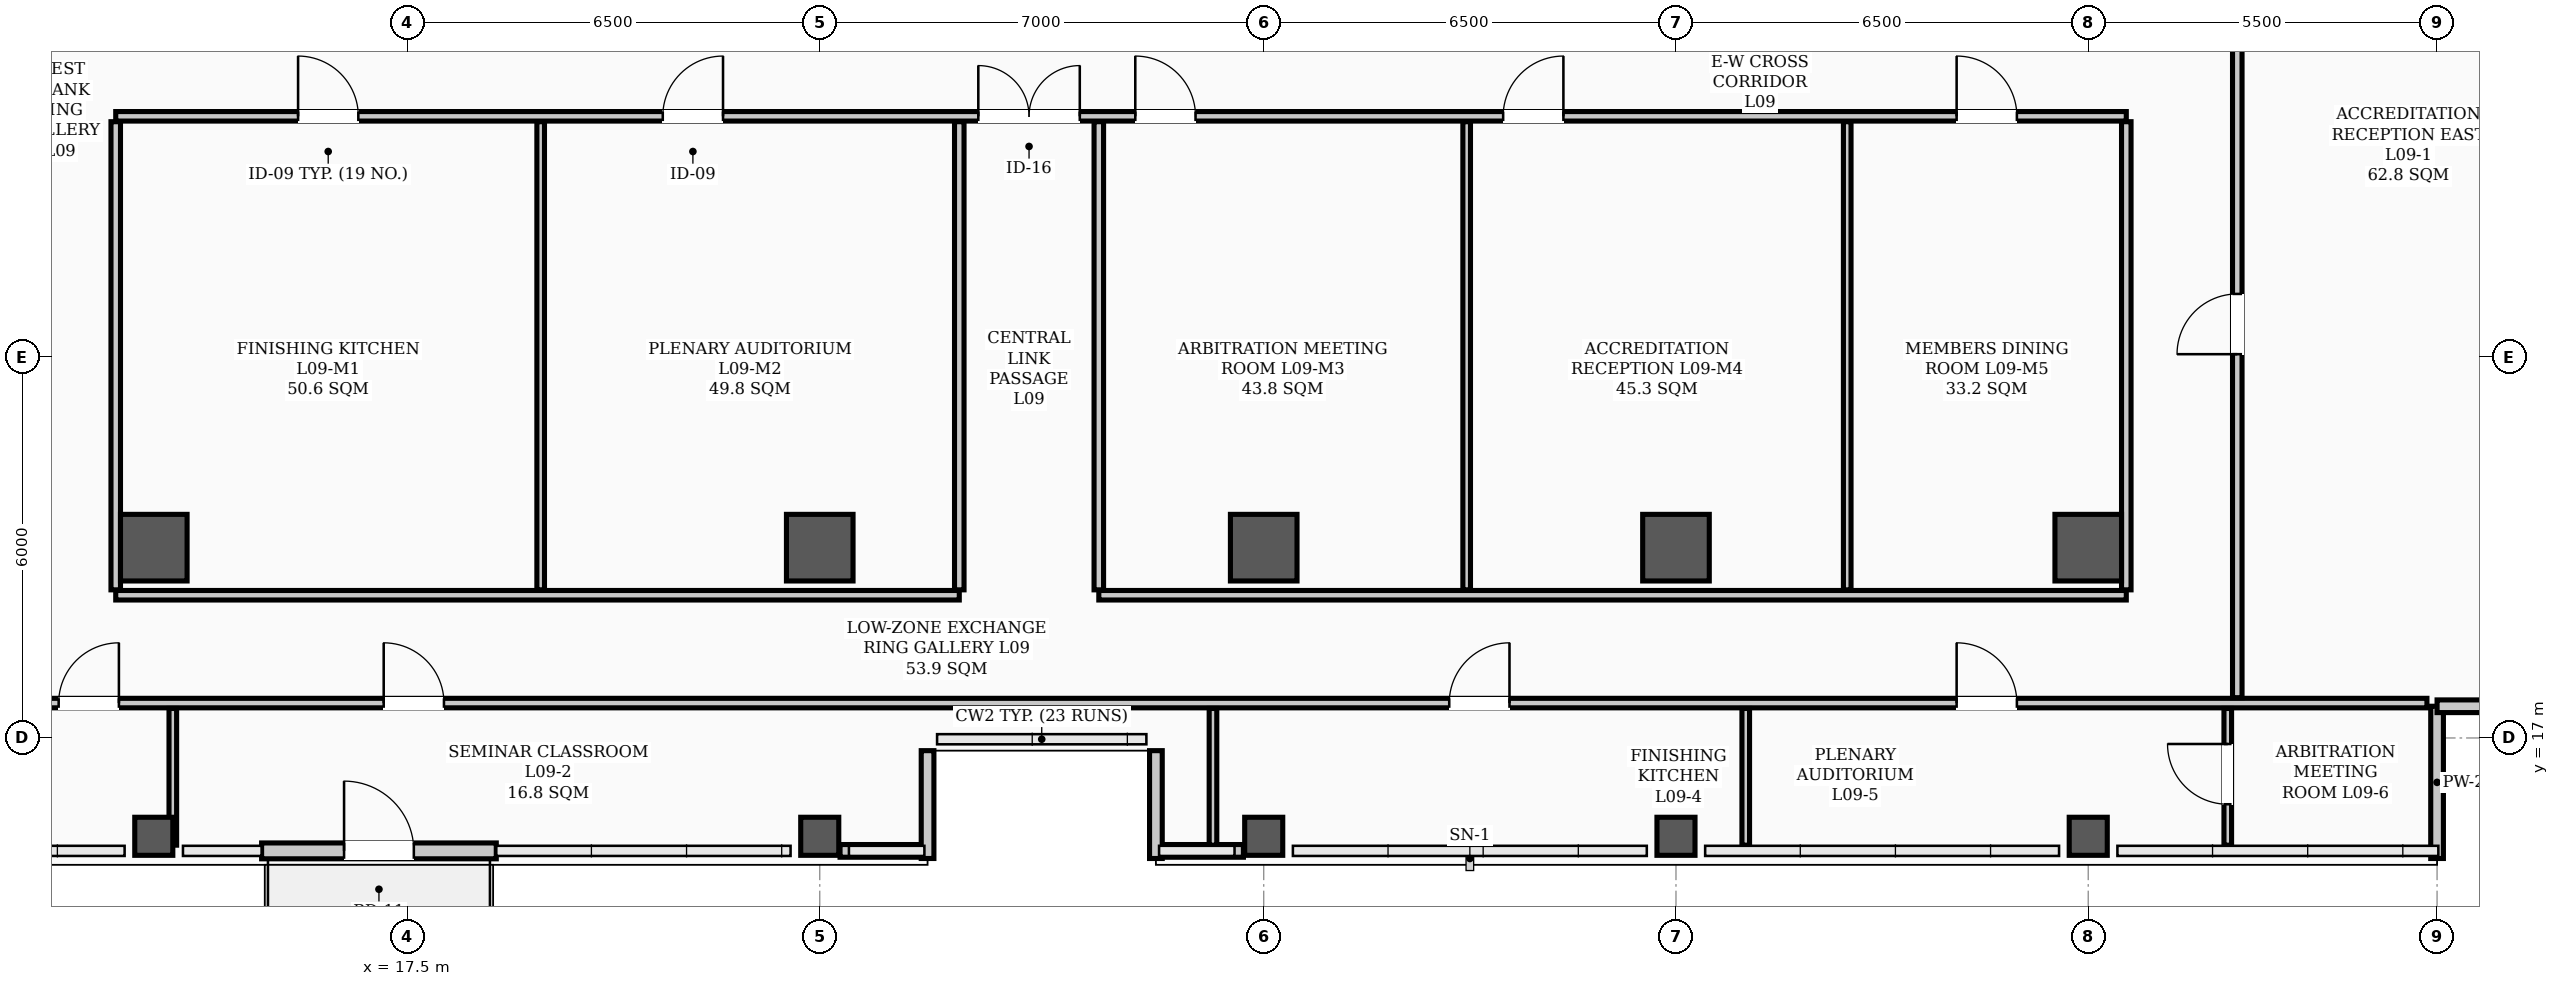
"""IFC4 building model, lengths in metres.
Left out: names, types, materials, properties, quantities, classifications, styles, units other than length and angle.
Written with IfcOpenShell. Run it as: python <this file> out.ifc"""

import sys

from ifc_helpers import new_model, si_unit, direction, frame, frame_2d, origin, origin_2d, place, context, subcontext, project, spatial, rectangle, hollow_rectangle, extrude, element, fill, save


model = new_model("IFC4")
c1 = context("Model", 3, precision=1e-05, world=origin(), true_north=direction((0.0, 1.0)))
c2 = subcontext(c1, "Body", "Model", "MODEL_VIEW")
j1 = project(units=[si_unit("LENGTHUNIT", "METRE"), si_unit("PLANEANGLEUNIT", "RADIAN")], contexts=[c1])
p1 = place(None, origin())
s1 = spatial("IfcSite", under=j1, at=p1, CompositionType="ELEMENT")
p2 = place(p1, origin())
s2 = spatial("IfcBuilding", under=s1, at=p2, CompositionType="ELEMENT")
p3 = place(p2, frame((0.0, 0.0, 38.2)))
s3 = spatial("IfcBuildingStorey", under=s2, at=p3, CompositionType="ELEMENT", Elevation=38.2)
for number, where, z_axis, x_axis in (
    (1, (13.5, 20.0, 0.0), (0.0, 0.0, 1.0), (1.0, 0.0, 0.0)),
    (2, (24.0, 20.0, 0.0), (0.0, 0.0, 1.0), (1.0, 0.0, 0.0)),
    (3, (31.0, 20.0, 0.0), (0.0, 0.0, 1.0), (1.0, 0.0, 0.0)),
    (4, (37.5, 20.0, 0.0), (0.0, 0.0, 1.0), (1.0, 0.0, 0.0)),
    (5, (44.0, 20.0, 0.0), (0.0, 0.0, 1.0), (1.0, 0.0, 0.0)),
):
    element("IfcColumn", number, at=place(p3, frame(where, z_axis=z_axis, x_axis=x_axis)), inside=s3, PredefinedType="COLUMN", context=c2, shape_type="SweptSolid", body=[
        extrude(hollow_rectangle(XDim=1.05, YDim=1.05, WallThickness=0.038, InnerFilletRadius=0.019, OuterFilletRadius=0.057, at=origin_2d()), origin(), (0.0, 0.0, 1.0), 3.9),
    ])
for number, where, z_axis, x_axis in (
    (6, (13.5, 15.45, 0.0), (0.0, 0.0, 1.0), (1.0, 0.0, 0.0)),
    (7, (24.0, 15.45, 0.0), (0.0, 0.0, 1.0), (1.0, 0.0, 0.0)),
    (8, (31.0, 15.45, 0.0), (0.0, 0.0, 1.0), (1.0, 0.0, 0.0)),
    (9, (37.5, 15.45, 0.0), (0.0, 0.0, 1.0), (1.0, 0.0, 0.0)),
    (10, (44.0, 15.45, 0.0), (0.0, 0.0, 1.0), (1.0, 0.0, 0.0)),
):
    element("IfcColumn", number, at=place(p3, frame(where, z_axis=z_axis, x_axis=x_axis)), inside=s3, PredefinedType="COLUMN", context=c2, shape_type="SweptSolid", body=[
        extrude(hollow_rectangle(XDim=0.6, YDim=0.6, WallThickness=0.026, InnerFilletRadius=0.013, OuterFilletRadius=0.039, at=origin_2d()), origin(), (0.0, 0.0, 1.0), 3.9),
    ])
for number, where, z_axis, x_axis in (
    (11, (24.32, 15.22, 0.0), (0.0, 0.0, 1.0), (1.0, 0.0, 0.0)),
    (12, (29.35, 15.22, 0.0), (0.0, 0.0, 1.0), (1.0, 0.0, 0.0)),
):
    element("IfcWall", number, at=place(p3, frame(where, z_axis=z_axis, x_axis=x_axis)), inside=s3, PredefinedType="PARAPET", context=c2, shape_type="SweptSolid", body=[
        extrude(rectangle(XDim=1.33, YDim=0.2, at=frame_2d((0.665, 0.0))), origin(), (0.0, 0.0, 1.0), 1.2),
    ])
for number, where, z_axis, x_axis in (
    (13, (49.5, 15.1, 0.0), (0.0, 0.0, 1.0), (0.0, 1.0, 0.0)),
    (14, (49.5, 17.5, 0.0), (0.0, 0.0, 1.0), (1.0, 0.0, 0.0)),
):
    element("IfcWall", number, at=place(p3, frame(where, z_axis=z_axis, x_axis=x_axis)), inside=s3, PredefinedType="PARAPET", context=c2, shape_type="SweptSolid", body=[
        extrude(rectangle(XDim=2.4, YDim=0.2, at=frame_2d((1.2, 0.0))), origin(), (0.0, 0.0, 1.0), 1.2),
    ])
for number, where, z_axis, x_axis in (
    (15, (25.7, 15.1, 0.0), (0.0, 0.0, 1.0), (0.0, 1.0, 0.0)),
    (16, (29.3, 16.8, 0.0), (0.0, 0.0, 1.0), (0.0, -1.0, 0.0)),
):
    element("IfcWall", number, at=place(p3, frame(where, z_axis=z_axis, x_axis=x_axis)), inside=s3, PredefinedType="PARAPET", context=c2, shape_type="SweptSolid", body=[
        extrude(rectangle(XDim=1.7, YDim=0.2, at=frame_2d((0.85, 0.0))), origin(), (0.0, 0.0, 1.0), 1.2),
    ])
p4 = place(p3, frame((15.2, 15.22, 0.0), z_axis=(0.0, 0.0, 1.0), x_axis=(1.0, 0.0, 0.0)))
e17 = element("IfcWall", 17, at=p4, inside=s3, PredefinedType="STANDARD", context=c2, shape_type="SweptSolid", body=[
    extrude(rectangle(XDim=3.7, YDim=0.25, at=frame_2d((1.85, 0.0))), origin(), (0.0, 0.0, 1.0), 3.18),
])
p5 = place(p4, frame((1.3, 0.0, 0.0)))
e18 = element("IfcOpeningElement", 18, at=p5, cuts=e17, PredefinedType="OPENING", context=c2, shape_type="SweptSolid", body=[
    extrude(rectangle(XDim=1.1, YDim=2.2, at=frame_2d((0.55, 1.1))), frame((0.0, 0.135, 0.0), z_axis=(0.0, -1.0, 0.0), x_axis=(1.0, 0.0, 0.0)), (0.0, 0.0, 1.0), 0.27),
])
p6 = place(p3, frame((12.9, 26.8, 0.0), z_axis=(0.0, 0.0, 1.0), x_axis=(1.0, 0.0, 0.0)))
e19 = element("IfcWall", 19, at=p6, inside=s3, PredefinedType="PARTITIONING", context=c2, shape_type="SweptSolid", body=[
    extrude(rectangle(XDim=31.7, YDim=0.15, at=frame_2d((15.85, 0.0))), origin(), (0.0, 0.0, 1.0), 3.1),
])
p7 = place(p6, frame((13.6, 0.0, 0.0)))
e20 = element("IfcOpeningElement", 20, at=p7, cuts=e19, PredefinedType="OPENING", context=c2, shape_type="SweptSolid", body=[
    extrude(rectangle(XDim=1.6, YDim=2.08, at=frame_2d((0.8, 1.04))), frame((0.0, 0.085, 0.0), z_axis=(0.0, -1.0, 0.0), x_axis=(1.0, 0.0, 0.0)), (0.0, 0.0, 1.0), 0.17),
])
p8 = place(p6, frame((2.875, 0.0, 0.0)))
e21 = element("IfcOpeningElement", 21, at=p8, cuts=e19, PredefinedType="OPENING", context=c2, shape_type="SweptSolid", body=[
    extrude(rectangle(XDim=0.95, YDim=2.08, at=frame_2d((0.475, 1.04))), frame((0.0, 0.085, 0.0), z_axis=(0.0, -1.0, 0.0), x_axis=(1.0, 0.0, 0.0)), (0.0, 0.0, 1.0), 0.17),
])
p9 = place(p6, frame((8.625, 0.0, 0.0)))
e22 = element("IfcOpeningElement", 22, at=p9, cuts=e19, PredefinedType="OPENING", context=c2, shape_type="SweptSolid", body=[
    extrude(rectangle(XDim=0.95, YDim=2.08, at=frame_2d((0.475, 1.04))), frame((0.0, 0.085, 0.0), z_axis=(0.0, -1.0, 0.0), x_axis=(1.0, 0.0, 0.0)), (0.0, 0.0, 1.0), 0.17),
])
p10 = place(p6, frame((16.075, 0.0, 0.0)))
e23 = element("IfcOpeningElement", 23, at=p10, cuts=e19, PredefinedType="OPENING", context=c2, shape_type="SweptSolid", body=[
    extrude(rectangle(XDim=0.95, YDim=2.08, at=frame_2d((0.475, 1.04))), frame((0.0, 0.085, 0.0), z_axis=(0.0, -1.0, 0.0), x_axis=(1.0, 0.0, 0.0)), (0.0, 0.0, 1.0), 0.17),
])
p11 = place(p6, frame((21.875, 0.0, 0.0)))
e24 = element("IfcOpeningElement", 24, at=p11, cuts=e19, PredefinedType="OPENING", context=c2, shape_type="SweptSolid", body=[
    extrude(rectangle(XDim=0.95, YDim=2.08, at=frame_2d((0.475, 1.04))), frame((0.0, 0.085, 0.0), z_axis=(0.0, -1.0, 0.0), x_axis=(1.0, 0.0, 0.0)), (0.0, 0.0, 1.0), 0.17),
])
p12 = place(p6, frame((29.025, 0.0, 0.0)))
e25 = element("IfcOpeningElement", 25, at=p12, cuts=e19, PredefinedType="OPENING", context=c2, shape_type="SweptSolid", body=[
    extrude(rectangle(XDim=0.95, YDim=2.08, at=frame_2d((0.475, 1.04))), frame((0.0, 0.085, 0.0), z_axis=(0.0, -1.0, 0.0), x_axis=(1.0, 0.0, 0.0)), (0.0, 0.0, 1.0), 0.17),
])
p13 = place(p3, frame((4.66, 17.55, 0.0), z_axis=(0.0, 0.0, 1.0), x_axis=(1.0, 0.0, 0.0)))
e26 = element("IfcWall", 26, at=p13, inside=s3, PredefinedType="PARTITIONING", context=c2, shape_type="SweptSolid", body=[
    extrude(rectangle(XDim=44.68, YDim=0.15, at=frame_2d((22.34, 0.0))), origin(), (0.0, 0.0, 1.0), 3.1),
])
p14 = place(p13, frame((7.34, 0.0, 0.0)))
e27 = element("IfcOpeningElement", 27, at=p14, cuts=e26, PredefinedType="OPENING", context=c2, shape_type="SweptSolid", body=[
    extrude(rectangle(XDim=0.95, YDim=2.08, at=frame_2d((0.475, 1.04))), frame((0.0, 0.085, 0.0), z_axis=(0.0, -1.0, 0.0), x_axis=(1.0, 0.0, 0.0)), (0.0, 0.0, 1.0), 0.17),
])
p15 = place(p13, frame((12.465, 0.0, 0.0)))
e28 = element("IfcOpeningElement", 28, at=p15, cuts=e26, PredefinedType="OPENING", context=c2, shape_type="SweptSolid", body=[
    extrude(rectangle(XDim=0.95, YDim=2.08, at=frame_2d((0.475, 1.04))), frame((0.0, 0.085, 0.0), z_axis=(0.0, -1.0, 0.0), x_axis=(1.0, 0.0, 0.0)), (0.0, 0.0, 1.0), 0.17),
])
p16 = place(p13, frame((29.265, 0.0, 0.0)))
e29 = element("IfcOpeningElement", 29, at=p16, cuts=e26, PredefinedType="OPENING", context=c2, shape_type="SweptSolid", body=[
    extrude(rectangle(XDim=0.95, YDim=2.08, at=frame_2d((0.475, 1.04))), frame((0.0, 0.085, 0.0), z_axis=(0.0, -1.0, 0.0), x_axis=(1.0, 0.0, 0.0)), (0.0, 0.0, 1.0), 0.17),
])
p17 = place(p13, frame((37.265, 0.0, 0.0)))
e30 = element("IfcOpeningElement", 30, at=p17, cuts=e26, PredefinedType="OPENING", context=c2, shape_type="SweptSolid", body=[
    extrude(rectangle(XDim=0.95, YDim=2.08, at=frame_2d((0.475, 1.04))), frame((0.0, 0.085, 0.0), z_axis=(0.0, -1.0, 0.0), x_axis=(1.0, 0.0, 0.0)), (0.0, 0.0, 1.0), 0.17),
])
p18 = place(p3, frame((12.9, 19.25, 0.0), z_axis=(0.0, 0.0, 1.0), x_axis=(1.0, 0.0, 0.0)))
e31 = element("IfcWall", 31, at=p18, inside=s3, PredefinedType="PARTITIONING", context=c2, shape_type="SweptSolid", body=[
    extrude(rectangle(XDim=13.3, YDim=0.15, at=frame_2d((6.65, 0.0))), origin(), (0.0, 0.0, 1.0), 3.1),
])
p19 = place(p3, frame((28.4, 19.25, 0.0), z_axis=(0.0, 0.0, 1.0), x_axis=(1.0, 0.0, 0.0)))
e32 = element("IfcWall", 32, at=p19, inside=s3, PredefinedType="PARTITIONING", context=c2, shape_type="SweptSolid", body=[
    extrude(rectangle(XDim=16.2, YDim=0.15, at=frame_2d((8.1, 0.0))), origin(), (0.0, 0.0, 1.0), 3.1),
])
for number, where, z_axis, x_axis in (
    (33, (26.2, 19.335, 0.0), (0.0, 0.0, 1.0), (0.0, 1.0, 0.0)),
    (34, (28.4, 19.335, 0.0), (0.0, 0.0, 1.0), (0.0, 1.0, 0.0)),
    (35, (12.9, 19.335, 0.0), (0.0, 0.0, 1.0), (0.0, 1.0, 0.0)),
):
    element("IfcWall", number, at=place(p3, frame(where, z_axis=z_axis, x_axis=x_axis)), inside=s3, PredefinedType="PARTITIONING", context=c2, shape_type="SweptSolid", body=[
        extrude(rectangle(XDim=7.38, YDim=0.15, at=frame_2d((3.69, 0.0))), origin(), (0.0, 0.0, 1.0), 3.0),
    ])
p20 = place(p3, frame((46.35, 17.635, 0.0), z_axis=(0.0, 0.0, 1.0), x_axis=(0.0, 1.0, 0.0)))
e36 = element("IfcWall", 36, at=p20, inside=s3, PredefinedType="PARTITIONING", context=c2, shape_type="SweptSolid", body=[
    extrude(rectangle(XDim=22.53, YDim=0.15, at=frame_2d((11.265, 0.0))), origin(), (0.0, 0.0, 1.0), 3.0),
])
p21 = place(p20, frame((5.415, 0.0, 0.0)))
e37 = element("IfcOpeningElement", 37, at=p21, cuts=e36, PredefinedType="OPENING", context=c2, shape_type="SweptSolid", body=[
    extrude(rectangle(XDim=0.95, YDim=2.08, at=frame_2d((0.475, 1.04))), frame((0.0, 0.085, 0.0), z_axis=(0.0, -1.0, 0.0), x_axis=(1.0, 0.0, 0.0)), (0.0, 0.0, 1.0), 0.17),
])
p22 = place(p20, frame((16.765, 0.0, 0.0)))
e38 = element("IfcOpeningElement", 38, at=p22, cuts=e36, PredefinedType="OPENING", context=c2, shape_type="SweptSolid", body=[
    extrude(rectangle(XDim=0.95, YDim=2.08, at=frame_2d((0.475, 1.04))), frame((0.0, 0.085, 0.0), z_axis=(0.0, -1.0, 0.0), x_axis=(1.0, 0.0, 0.0)), (0.0, 0.0, 1.0), 0.17),
])
p23 = place(p3, frame((44.6, 19.335, 0.0), z_axis=(0.0, 0.0, 1.0), x_axis=(0.0, 1.0, 0.0)))
e39 = element("IfcWall", 39, at=p23, inside=s3, PredefinedType="PARTITIONING", context=c2, shape_type="SweptSolid", body=[
    extrude(rectangle(XDim=7.38, YDim=0.15, at=frame_2d((3.69, 0.0))), origin(), (0.0, 0.0, 1.0), 3.0),
])
p24 = place(p3, frame((13.8, 15.31, 0.0), z_axis=(0.0, 0.0, 1.0), x_axis=(0.0, 1.0, 0.0)))
e40 = element("IfcWall", 40, at=p24, inside=s3, PredefinedType="PARTITIONING", context=c2, shape_type="SweptSolid", body=[
    extrude(rectangle(XDim=2.155, YDim=0.12, at=frame_2d((1.078, 0.0))), origin(), (0.0, 0.0, 1.0), 3.1),
])
for number, where, z_axis, x_axis in (
    (41, (30.2, 15.31, 0.0), (0.0, 0.0, 1.0), (0.0, 1.0, 0.0)),
    (42, (38.6, 15.31, 0.0), (0.0, 0.0, 1.0), (0.0, 1.0, 0.0)),
):
    element("IfcWall", number, at=place(p3, frame(where, z_axis=z_axis, x_axis=x_axis)), inside=s3, PredefinedType="PARTITIONING", context=c2, shape_type="SweptSolid", body=[
        extrude(rectangle(XDim=2.155, YDim=0.12, at=frame_2d((1.078, 0.0))), origin(), (0.0, 0.0, 1.0), 3.212),
    ])
p25 = place(p3, frame((46.2, 15.31, 0.0), z_axis=(0.0, 0.0, 1.0), x_axis=(0.0, 1.0, 0.0)))
e43 = element("IfcWall", 43, at=p25, inside=s3, PredefinedType="PARTITIONING", context=c2, shape_type="SweptSolid", body=[
    extrude(rectangle(XDim=2.155, YDim=0.12, at=frame_2d((1.078, 0.0))), origin(), (0.0, 0.0, 1.0), 3.72),
])
p26 = place(p25, frame((0.645, 0.0, 0.0)))
e44 = element("IfcOpeningElement", 44, at=p26, cuts=e43, PredefinedType="OPENING", context=c2, shape_type="SweptSolid", body=[
    extrude(rectangle(XDim=0.95, YDim=2.08, at=frame_2d((0.475, 1.04))), frame((0.0, 0.07, 0.0), z_axis=(0.0, -1.0, 0.0), x_axis=(1.0, 0.0, 0.0)), (0.0, 0.0, 1.0), 0.14),
])
for number, where, z_axis, x_axis in (
    (45, (19.6, 19.335, 0.0), (0.0, 0.0, 1.0), (0.0, 1.0, 0.0)),
    (46, (34.2, 19.335, 0.0), (0.0, 0.0, 1.0), (0.0, 1.0, 0.0)),
    (47, (40.2, 19.335, 0.0), (0.0, 0.0, 1.0), (0.0, 1.0, 0.0)),
):
    element("IfcWall", number, at=place(p3, frame(where, z_axis=z_axis, x_axis=x_axis)), inside=s3, PredefinedType="PARTITIONING", context=c2, shape_type="SweptSolid", body=[
        extrude(rectangle(XDim=7.38, YDim=0.12, at=frame_2d((3.69, 0.0))), origin(), (0.0, 0.0, 1.0), 3.0),
    ])
p27 = place(p5, origin())
e48 = element("IfcDoor", 48, at=p27, inside=s3, OperationType="SINGLE_SWING_LEFT", PredefinedType="DOOR", context=c2, shape_type="SweptSolid", body=[
    extrude(rectangle(XDim=1.1, YDim=2.2, at=frame_2d((0.55, 1.1))), frame((0.0, 0.025, 0.0), z_axis=(0.0, -1.0, 0.0), x_axis=(1.0, 0.0, 0.0)), (0.0, 0.0, 1.0), 0.05),
])
fill(e18, e48)
p28 = place(p7, origin())
e49 = element("IfcDoor", 49, at=p28, inside=s3, OperationType="DOUBLE_DOOR_SINGLE_SWING", PredefinedType="DOOR", context=c2, shape_type="SweptSolid", body=[
    extrude(rectangle(XDim=1.6, YDim=2.08, at=frame_2d((0.8, 1.04))), frame((0.0, 0.025, 0.0), z_axis=(0.0, -1.0, 0.0), x_axis=(1.0, 0.0, 0.0)), (0.0, 0.0, 1.0), 0.05),
])
fill(e20, e49)
p29 = place(p14, origin())
e50 = element("IfcDoor", 50, at=p29, inside=s3, OperationType="SINGLE_SWING_RIGHT", PredefinedType="DOOR", context=c2, shape_type="SweptSolid", body=[
    extrude(rectangle(XDim=0.95, YDim=2.08, at=frame_2d((0.475, 1.04))), frame((0.0, 0.025, 0.0), z_axis=(0.0, -1.0, 0.0), x_axis=(1.0, 0.0, 0.0)), (0.0, 0.0, 1.0), 0.05),
])
fill(e27, e50)
p30 = place(p15, origin())
e51 = element("IfcDoor", 51, at=p30, inside=s3, OperationType="SINGLE_SWING_LEFT", PredefinedType="DOOR", context=c2, shape_type="SweptSolid", body=[
    extrude(rectangle(XDim=0.95, YDim=2.08, at=frame_2d((0.475, 1.04))), frame((0.0, 0.025, 0.0), z_axis=(0.0, -1.0, 0.0), x_axis=(1.0, 0.0, 0.0)), (0.0, 0.0, 1.0), 0.05),
])
fill(e28, e51)
p31 = place(p16, origin())
e52 = element("IfcDoor", 52, at=p31, inside=s3, OperationType="SINGLE_SWING_RIGHT", PredefinedType="DOOR", context=c2, shape_type="SweptSolid", body=[
    extrude(rectangle(XDim=0.95, YDim=2.08, at=frame_2d((0.475, 1.04))), frame((0.0, 0.025, 0.0), z_axis=(0.0, -1.0, 0.0), x_axis=(1.0, 0.0, 0.0)), (0.0, 0.0, 1.0), 0.05),
])
fill(e29, e52)
p32 = place(p17, origin())
e53 = element("IfcDoor", 53, at=p32, inside=s3, OperationType="SINGLE_SWING_LEFT", PredefinedType="DOOR", context=c2, shape_type="SweptSolid", body=[
    extrude(rectangle(XDim=0.95, YDim=2.08, at=frame_2d((0.475, 1.04))), frame((0.0, 0.025, 0.0), z_axis=(0.0, -1.0, 0.0), x_axis=(1.0, 0.0, 0.0)), (0.0, 0.0, 1.0), 0.05),
])
fill(e30, e53)
p33 = place(p26, origin())
e54 = element("IfcDoor", 54, at=p33, inside=s3, OperationType="SINGLE_SWING_RIGHT", PredefinedType="DOOR", context=c2, shape_type="SweptSolid", body=[
    extrude(rectangle(XDim=0.95, YDim=2.08, at=frame_2d((0.475, 1.04))), frame((0.0, 0.025, 0.0), z_axis=(0.0, -1.0, 0.0), x_axis=(1.0, 0.0, 0.0)), (0.0, 0.0, 1.0), 0.05),
])
fill(e44, e54)
p34 = place(p8, origin())
e55 = element("IfcDoor", 55, at=p34, inside=s3, OperationType="SINGLE_SWING_LEFT", PredefinedType="DOOR", context=c2, shape_type="SweptSolid", body=[
    extrude(rectangle(XDim=0.95, YDim=2.08, at=frame_2d((0.475, 1.04))), frame((0.0, 0.025, 0.0), z_axis=(0.0, -1.0, 0.0), x_axis=(1.0, 0.0, 0.0)), (0.0, 0.0, 1.0), 0.05),
])
fill(e21, e55)
p35 = place(p9, origin())
e56 = element("IfcDoor", 56, at=p35, inside=s3, OperationType="SINGLE_SWING_RIGHT", PredefinedType="DOOR", context=c2, shape_type="SweptSolid", body=[
    extrude(rectangle(XDim=0.95, YDim=2.08, at=frame_2d((0.475, 1.04))), frame((0.0, 0.025, 0.0), z_axis=(0.0, -1.0, 0.0), x_axis=(1.0, 0.0, 0.0)), (0.0, 0.0, 1.0), 0.05),
])
fill(e22, e56)
p36 = place(p10, origin())
e57 = element("IfcDoor", 57, at=p36, inside=s3, OperationType="SINGLE_SWING_LEFT", PredefinedType="DOOR", context=c2, shape_type="SweptSolid", body=[
    extrude(rectangle(XDim=0.95, YDim=2.08, at=frame_2d((0.475, 1.04))), frame((0.0, 0.025, 0.0), z_axis=(0.0, -1.0, 0.0), x_axis=(1.0, 0.0, 0.0)), (0.0, 0.0, 1.0), 0.05),
])
fill(e23, e57)
p37 = place(p11, origin())
e58 = element("IfcDoor", 58, at=p37, inside=s3, OperationType="SINGLE_SWING_RIGHT", PredefinedType="DOOR", context=c2, shape_type="SweptSolid", body=[
    extrude(rectangle(XDim=0.95, YDim=2.08, at=frame_2d((0.475, 1.04))), frame((0.0, 0.025, 0.0), z_axis=(0.0, -1.0, 0.0), x_axis=(1.0, 0.0, 0.0)), (0.0, 0.0, 1.0), 0.05),
])
fill(e24, e58)
p38 = place(p12, origin())
e59 = element("IfcDoor", 59, at=p38, inside=s3, OperationType="SINGLE_SWING_LEFT", PredefinedType="DOOR", context=c2, shape_type="SweptSolid", body=[
    extrude(rectangle(XDim=0.95, YDim=2.08, at=frame_2d((0.475, 1.04))), frame((0.0, 0.025, 0.0), z_axis=(0.0, -1.0, 0.0), x_axis=(1.0, 0.0, 0.0)), (0.0, 0.0, 1.0), 0.05),
])
fill(e25, e59)
p39 = place(p21, origin())
e60 = element("IfcDoor", 60, at=p39, inside=s3, OperationType="SINGLE_SWING_LEFT", PredefinedType="DOOR", context=c2, shape_type="SweptSolid", body=[
    extrude(rectangle(XDim=0.95, YDim=2.08, at=frame_2d((0.475, 1.04))), frame((0.0, 0.025, 0.0), z_axis=(0.0, -1.0, 0.0), x_axis=(1.0, 0.0, 0.0)), (0.0, 0.0, 1.0), 0.05),
])
fill(e37, e60)
save(model, sys.argv[1])
